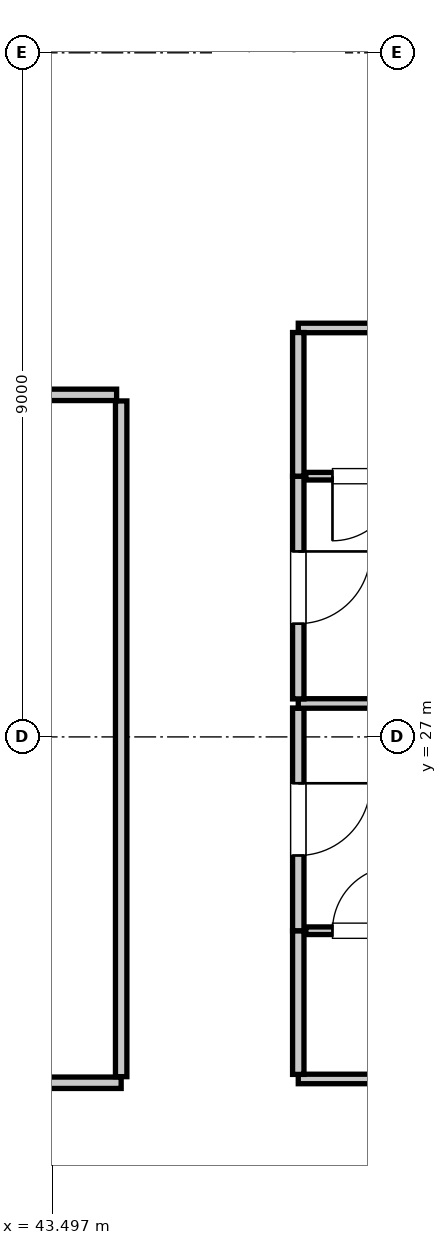
"""IFC4 building model, lengths in metres.
Left out: names, types, materials, properties, quantities, classifications, styles, units other than length and angle.
Written with IfcOpenShell. Run it as: python <this file> out.ifc"""

import sys

from ifc_helpers import new_model, si_unit, direction, frame, frame_2d, origin, place, context, subcontext, project, spatial, rectangle, extrude, element, fill, save


model = new_model("IFC4")
c1 = context("Model", 3, precision=1e-05, world=origin(), true_north=direction((0.0, 1.0)))
c2 = subcontext(c1, "Body", "Model", "MODEL_VIEW")
j1 = project(units=[si_unit("LENGTHUNIT", "METRE"), si_unit("PLANEANGLEUNIT", "RADIAN")], contexts=[c1])
p1 = place(None, origin())
s1 = spatial("IfcSite", under=j1, at=p1, CompositionType="ELEMENT")
p2 = place(p1, origin())
s2 = spatial("IfcBuilding", under=s1, at=p2, CompositionType="ELEMENT")
p3 = place(p2, frame((0.0, 0.0, 250.95)))
s3 = spatial("IfcBuildingStorey", under=s2, at=p3, CompositionType="ELEMENT", Elevation=250.95)
p4 = place(p3, frame((31.25, 22.45, 0.0), z_axis=(0.0, 0.0, 1.0), x_axis=(1.0, 0.0, 0.0)))
e1 = element("IfcWall", 1, at=p4, inside=s3, PredefinedType="PARTITIONING", context=c2, shape_type="SweptSolid", body=[
    extrude(rectangle(XDim=13.15, YDim=0.15, at=frame_2d((6.575, 0.0))), origin(), (0.0, 0.0, 1.0), 3.61),
])
p5 = place(p3, frame((44.4, 22.53, 0.0), z_axis=(0.0, 0.0, 1.0), x_axis=(0.0, 1.0, 0.0)))
e2 = element("IfcWall", 2, at=p5, inside=s3, PredefinedType="PARTITIONING", context=c2, shape_type="SweptSolid", body=[
    extrude(rectangle(XDim=8.89, YDim=0.15, at=frame_2d((4.445, 0.0))), origin(), (0.0, 0.0, 1.0), 3.61),
])
p6 = place(p3, frame((38.775, 31.5, 0.0), z_axis=(0.0, 0.0, 1.0), x_axis=(1.0, 0.0, 0.0)))
e3 = element("IfcWall", 3, at=p6, inside=s3, PredefinedType="PARTITIONING", context=c2, shape_type="SweptSolid", body=[
    extrude(rectangle(XDim=5.565, YDim=0.15, at=frame_2d((2.782, 0.0))), origin(), (0.0, 0.0, 1.0), 3.61),
])
p7 = place(p6, frame((2.332, 0.0, 0.0)))
e4 = element("IfcOpeningElement", 4, at=p7, cuts=e3, PredefinedType="OPENING", context=c2, shape_type="SweptSolid", body=[
    extrude(rectangle(XDim=0.9, YDim=2.1, at=frame_2d((0.45, 1.05))), frame((0.0, 0.085, 0.0), z_axis=(0.0, -1.0, 0.0), x_axis=(1.0, 0.0, 0.0)), (0.0, 0.0, 1.0), 0.17),
])
for number, where, z_axis, x_axis in (
    (5, (46.73, 22.5, 0.0), (0.0, 0.0, 1.0), (1.0, 0.0, 0.0)),
    (6, (46.73, 32.38, 0.0), (0.0, 0.0, 1.0), (1.0, 0.0, 0.0)),
):
    element("IfcWall", number, at=place(p3, frame(where, z_axis=z_axis, x_axis=x_axis)), inside=s3, PredefinedType="PARTITIONING", context=c2, shape_type="SweptSolid", body=[
        extrude(rectangle(XDim=13.37, YDim=0.125, at=frame_2d((6.685, 0.0))), origin(), (0.0, 0.0, 1.0), 3.61),
    ])
p8 = place(p3, frame((46.73, 22.56, 0.0), z_axis=(0.0, 0.0, 1.0), x_axis=(0.0, 1.0, 0.0)))
e7 = element("IfcWall", 7, at=p8, inside=s3, PredefinedType="PARTITIONING", context=c2, shape_type="SweptSolid", body=[
    extrude(rectangle(XDim=1.89, YDim=0.15, at=frame_2d((0.945, 0.0))), origin(), (0.0, 0.0, 1.0), 3.61),
])
p9 = place(p3, frame((46.73, 24.45, 0.0), z_axis=(0.0, 0.0, 1.0), x_axis=(0.0, 1.0, 0.0)))
e8 = element("IfcWall", 8, at=p9, inside=s3, PredefinedType="PARTITIONING", context=c2, shape_type="SweptSolid", body=[
    extrude(rectangle(XDim=2.93, YDim=0.15, at=frame_2d((1.465, 0.0))), origin(), (0.0, 0.0, 1.0), 3.61),
])
p10 = place(p9, frame((0.99, 0.0, 0.0)))
e9 = element("IfcOpeningElement", 9, at=p10, cuts=e8, PredefinedType="OPENING", context=c2, shape_type="SweptSolid", body=[
    extrude(rectangle(XDim=0.95, YDim=2.15, at=frame_2d((0.475, 1.075))), frame((0.0, 0.085, 0.0), z_axis=(0.0, -1.0, 0.0), x_axis=(1.0, 0.0, 0.0)), (0.0, 0.0, 1.0), 0.17),
])
p11 = place(p3, frame((46.83, 24.45, 0.0), z_axis=(0.0, 0.0, 1.0), x_axis=(1.0, 0.0, 0.0)))
e10 = element("IfcWall", 10, at=p11, inside=s3, PredefinedType="PARTITIONING", context=c2, shape_type="SweptSolid", body=[
    extrude(rectangle(XDim=2.3, YDim=0.1, at=frame_2d((1.15, 0.0))), origin(), (0.0, 0.0, 1.0), 3.61),
])
p12 = place(p11, frame((0.35, 0.0, 0.0)))
e11 = element("IfcOpeningElement", 11, at=p12, cuts=e10, PredefinedType="OPENING", context=c2, shape_type="SweptSolid", body=[
    extrude(rectangle(XDim=0.85, YDim=2.1, at=frame_2d((0.425, 1.05))), frame((0.0, 0.06, 0.0), z_axis=(0.0, -1.0, 0.0), x_axis=(1.0, 0.0, 0.0)), (0.0, 0.0, 1.0), 0.12),
])
p13 = place(p3, frame((46.73, 27.44, 0.0), z_axis=(0.0, 0.0, 1.0), x_axis=(1.0, 0.0, 0.0)))
e12 = element("IfcWall", 12, at=p13, inside=s3, PredefinedType="PARTITIONING", context=c2, shape_type="SweptSolid", body=[
    extrude(rectangle(XDim=13.37, YDim=0.125, at=frame_2d((6.685, 0.0))), origin(), (0.0, 0.0, 1.0), 3.61),
])
p14 = place(p3, frame((46.73, 27.5, 0.0), z_axis=(0.0, 0.0, 1.0), x_axis=(0.0, 1.0, 0.0)))
e13 = element("IfcWall", 13, at=p14, inside=s3, PredefinedType="PARTITIONING", context=c2, shape_type="SweptSolid", body=[
    extrude(rectangle(XDim=2.93, YDim=0.15, at=frame_2d((1.465, 0.0))), origin(), (0.0, 0.0, 1.0), 3.61),
])
p15 = place(p14, frame((0.99, 0.0, 0.0)))
e14 = element("IfcOpeningElement", 14, at=p15, cuts=e13, PredefinedType="OPENING", context=c2, shape_type="SweptSolid", body=[
    extrude(rectangle(XDim=0.95, YDim=2.15, at=frame_2d((0.475, 1.075))), frame((0.0, 0.085, 0.0), z_axis=(0.0, -1.0, 0.0), x_axis=(1.0, 0.0, 0.0)), (0.0, 0.0, 1.0), 0.17),
])
p16 = place(p3, frame((46.73, 30.43, 0.0), z_axis=(0.0, 0.0, 1.0), x_axis=(0.0, 1.0, 0.0)))
e15 = element("IfcWall", 15, at=p16, inside=s3, PredefinedType="PARTITIONING", context=c2, shape_type="SweptSolid", body=[
    extrude(rectangle(XDim=1.89, YDim=0.15, at=frame_2d((0.945, 0.0))), origin(), (0.0, 0.0, 1.0), 3.61),
])
p17 = place(p3, frame((46.83, 30.43, 0.0), z_axis=(0.0, 0.0, 1.0), x_axis=(1.0, 0.0, 0.0)))
e16 = element("IfcWall", 16, at=p17, inside=s3, PredefinedType="PARTITIONING", context=c2, shape_type="SweptSolid", body=[
    extrude(rectangle(XDim=2.3, YDim=0.1, at=frame_2d((1.15, 0.0))), origin(), (0.0, 0.0, 1.0), 3.61),
])
p18 = place(p17, frame((0.35, 0.0, 0.0)))
e17 = element("IfcOpeningElement", 17, at=p18, cuts=e16, PredefinedType="OPENING", context=c2, shape_type="SweptSolid", body=[
    extrude(rectangle(XDim=0.85, YDim=2.1, at=frame_2d((0.425, 1.05))), frame((0.0, 0.06, 0.0), z_axis=(0.0, -1.0, 0.0), x_axis=(1.0, 0.0, 0.0)), (0.0, 0.0, 1.0), 0.12),
])
p19 = place(p12, origin())
e18 = element("IfcDoor", 18, at=p19, inside=s3, OperationType="SINGLE_SWING_RIGHT", PredefinedType="DOOR", context=c2, shape_type="SweptSolid", body=[
    extrude(rectangle(XDim=0.85, YDim=2.1, at=frame_2d((0.425, 1.05))), frame((0.0, 0.025, 0.0), z_axis=(0.0, -1.0, 0.0), x_axis=(1.0, 0.0, 0.0)), (0.0, 0.0, 1.0), 0.05),
])
fill(e11, e18)
p20 = place(p10, frame((0.95, 0.0, 0.0), z_axis=(0.0, 0.0, 1.0), x_axis=(-1.0, 0.0, 0.0)))
e19 = element("IfcDoor", 19, at=p20, inside=s3, OperationType="SINGLE_SWING_LEFT", PredefinedType="DOOR", context=c2, shape_type="SweptSolid", body=[
    extrude(rectangle(XDim=0.95, YDim=2.15, at=frame_2d((0.475, 1.075))), frame((0.0, 0.025, 0.0), z_axis=(0.0, -1.0, 0.0), x_axis=(1.0, 0.0, 0.0)), (0.0, 0.0, 1.0), 0.05),
])
fill(e9, e19)
p21 = place(p18, frame((0.85, 0.0, 0.0), z_axis=(0.0, 0.0, 1.0), x_axis=(-1.0, 0.0, 0.0)))
e20 = element("IfcDoor", 20, at=p21, inside=s3, OperationType="SINGLE_SWING_RIGHT", PredefinedType="DOOR", context=c2, shape_type="SweptSolid", body=[
    extrude(rectangle(XDim=0.85, YDim=2.1, at=frame_2d((0.425, 1.05))), frame((0.0, 0.025, 0.0), z_axis=(0.0, -1.0, 0.0), x_axis=(1.0, 0.0, 0.0)), (0.0, 0.0, 1.0), 0.05),
])
fill(e17, e20)
p22 = place(p15, frame((0.95, 0.0, 0.0), z_axis=(0.0, 0.0, 1.0), x_axis=(-1.0, 0.0, 0.0)))
e21 = element("IfcDoor", 21, at=p22, inside=s3, OperationType="SINGLE_SWING_LEFT", PredefinedType="DOOR", context=c2, shape_type="SweptSolid", body=[
    extrude(rectangle(XDim=0.95, YDim=2.15, at=frame_2d((0.475, 1.075))), frame((0.0, 0.025, 0.0), z_axis=(0.0, -1.0, 0.0), x_axis=(1.0, 0.0, 0.0)), (0.0, 0.0, 1.0), 0.05),
])
fill(e14, e21)
save(model, sys.argv[1])
